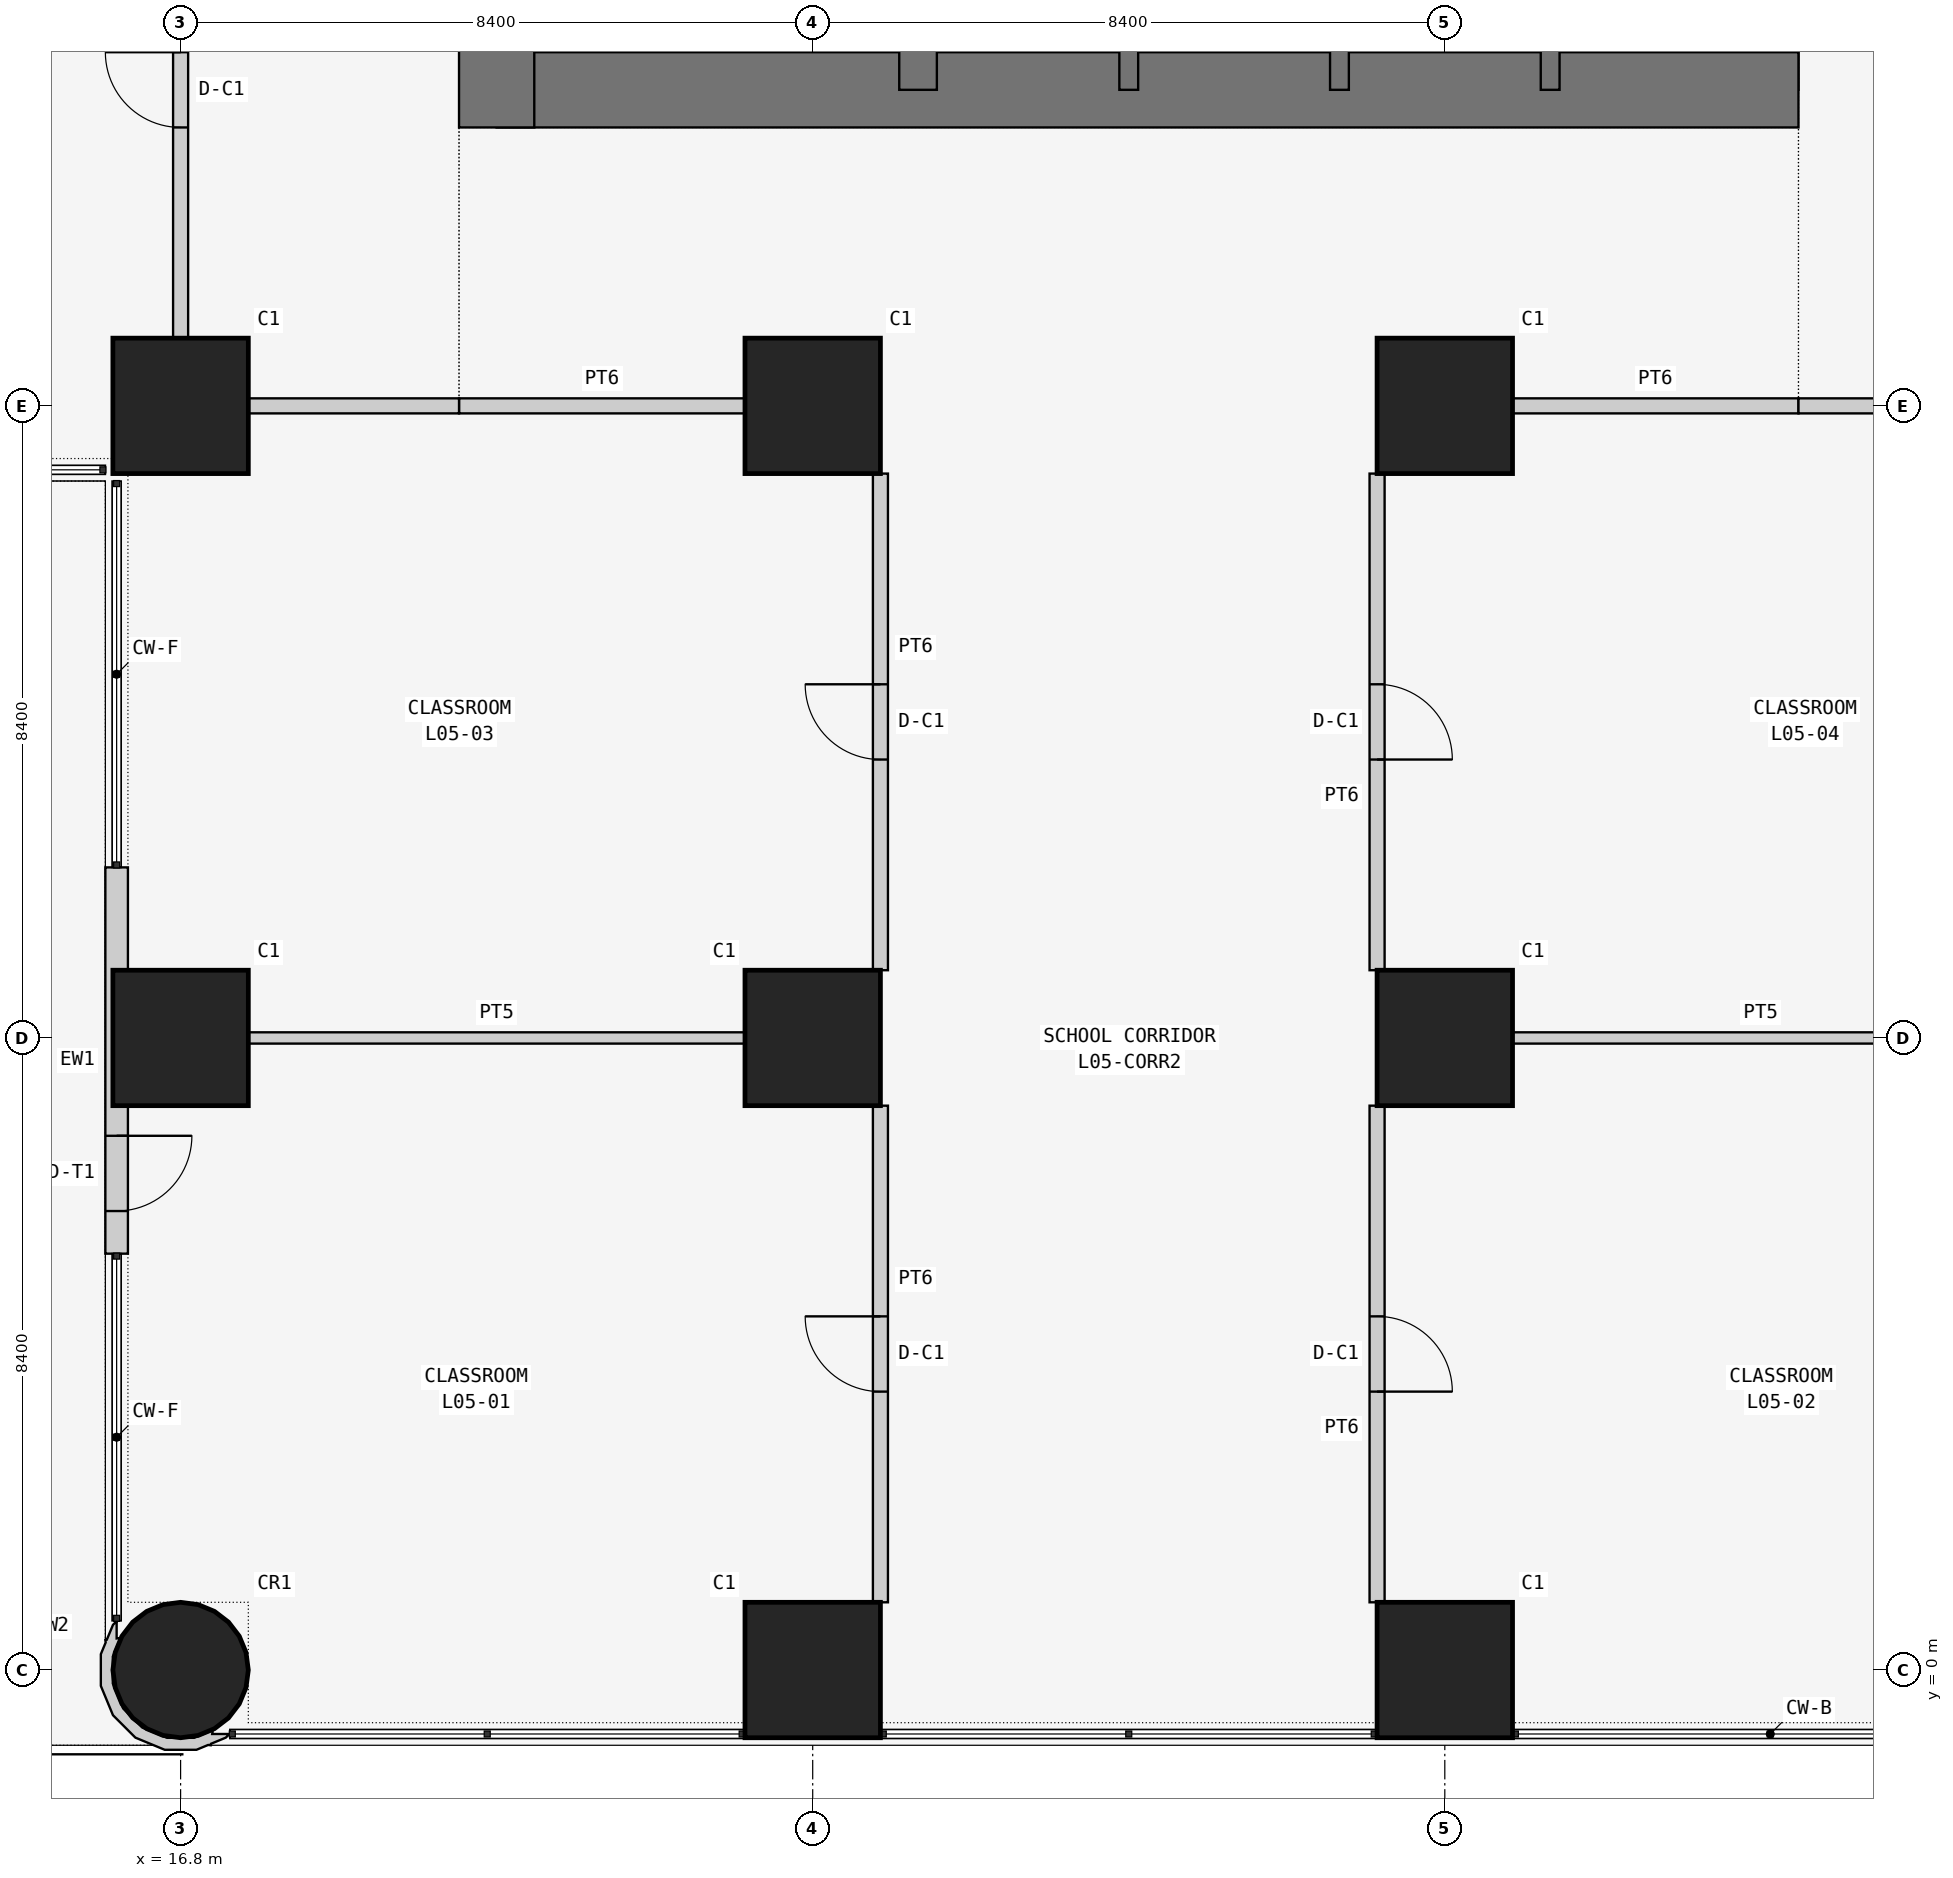
"""IFC4 building model, lengths in metres.
Left out: names, types, materials, properties, quantities, classifications, styles, units other than length and angle.
Written with IfcOpenShell. Run it as: python <this file> out.ifc"""

import sys

from ifc_helpers import new_model, si_unit, direction, frame, frame_2d, origin, origin_2d, place, context, subcontext, project, spatial, polyline, rectangle, circle, outline, extrude, element, fill, save


model = new_model("IFC4")
c1 = context("Model", 3, precision=1e-05, world=origin(), true_north=direction((0.0, 1.0)))
c2 = subcontext(c1, "Body", "Model", "MODEL_VIEW")
j1 = project(units=[si_unit("LENGTHUNIT", "METRE"), si_unit("PLANEANGLEUNIT", "RADIAN")], contexts=[c1])
p1 = place(None, origin())
s1 = spatial("IfcSite", under=j1, at=p1, CompositionType="ELEMENT")
p2 = place(p1, origin())
s2 = spatial("IfcBuilding", under=s1, at=p2, CompositionType="ELEMENT")
p3 = place(p2, frame((0.0, 0.0, 24.0)))
s3 = spatial("IfcBuildingStorey", under=s2, at=p3, CompositionType="ELEMENT", Elevation=24.0)
p4 = place(p3, frame((16.8, 0.0, 0.0), z_axis=(0.0, 0.0, 1.0), x_axis=(1.0, 0.0, 0.0)))
e1 = element("IfcColumn", 1, at=p4, inside=s3, PredefinedType="COLUMN", context=c2, shape_type="SweptSolid", body=[
    extrude(circle(Radius=0.9, at=origin_2d()), origin(), (0.0, 0.0, 1.0), 4.5),
])
for number, where, z_axis, x_axis in (
    (2, (16.8, 8.4, 0.0), (0.0, 0.0, 1.0), (1.0, 0.0, 0.0)),
    (3, (16.8, 16.8, 0.0), (0.0, 0.0, 1.0), (1.0, 0.0, 0.0)),
    (4, (25.2, 0.0, 0.0), (0.0, 0.0, 1.0), (1.0, 0.0, 0.0)),
    (5, (25.2, 8.4, 0.0), (0.0, 0.0, 1.0), (1.0, 0.0, 0.0)),
    (6, (25.2, 16.8, 0.0), (0.0, 0.0, 1.0), (1.0, 0.0, 0.0)),
    (7, (33.6, 0.0, 0.0), (0.0, 0.0, 1.0), (1.0, 0.0, 0.0)),
    (8, (33.6, 8.4, 0.0), (0.0, 0.0, 1.0), (1.0, 0.0, 0.0)),
    (9, (33.6, 16.8, 0.0), (0.0, 0.0, 1.0), (1.0, 0.0, 0.0)),
):
    element("IfcColumn", number, at=place(p3, frame(where, z_axis=z_axis, x_axis=x_axis)), inside=s3, PredefinedType="COLUMN", context=c2, shape_type="SweptSolid", body=[
        extrude(rectangle(XDim=1.8, YDim=1.8, at=origin_2d()), origin(), (0.0, 0.0, 1.0), 4.5),
    ])
p5 = place(p3, frame((21.0, 21.0, 0.0), z_axis=(0.0, 0.0, 1.0), x_axis=(1.0, 0.0, 0.0)))
e10 = element("IfcWall", 10, at=p5, inside=s3, PredefinedType="SHEAR", context=c2, shape_type="SweptSolid", body=[
    extrude(rectangle(XDim=17.3, YDim=1.0, at=frame_2d((8.65, 0.0))), origin(), (0.0, 0.0, 1.0), 4.5),
])
p6 = place(p3, frame((37.8, 21.0, 0.0), z_axis=(0.0, 0.0, 1.0), x_axis=(0.0, 1.0, 0.0)))
e11 = element("IfcWall", 11, at=p6, inside=s3, PredefinedType="SHEAR", context=c2, shape_type="SweptSolid", body=[
    extrude(rectangle(XDim=17.3, YDim=1.0, at=frame_2d((8.65, 0.0))), origin(), (0.0, 0.0, 1.0), 4.5),
])
p7 = place(p6, frame((5.2, 0.0, 0.0)))
e12 = element("IfcOpeningElement", 12, at=p7, cuts=e11, PredefinedType="OPENING", context=c2, shape_type="SweptSolid", body=[
    extrude(rectangle(XDim=1.2, YDim=2.1, at=frame_2d((0.6, 1.05))), frame((0.0, 0.51, 0.0), z_axis=(0.0, -1.0, 0.0), x_axis=(1.0, 0.0, 0.0)), (0.0, 0.0, 1.0), 1.02),
])
p8 = place(p3, frame((21.0, 37.8, 0.0), z_axis=(0.0, 0.0, 1.0), x_axis=(0.0, -1.0, 0.0)))
e13 = element("IfcWall", 13, at=p8, inside=s3, PredefinedType="SHEAR", context=c2, shape_type="SweptSolid", body=[
    extrude(rectangle(XDim=17.3, YDim=1.0, at=frame_2d((8.65, 0.0))), origin(), (0.0, 0.0, 1.0), 4.5),
])
p9 = place(p8, frame((5.4, 0.0, 0.0)))
e14 = element("IfcOpeningElement", 14, at=p9, cuts=e13, PredefinedType="OPENING", context=c2, shape_type="SweptSolid", body=[
    extrude(rectangle(XDim=1.2, YDim=2.1, at=frame_2d((0.6, 1.05))), frame((0.0, 0.51, 0.0), z_axis=(0.0, -1.0, 0.0), x_axis=(1.0, 0.0, 0.0)), (0.0, 0.0, 1.0), 1.02),
])
p10 = place(p3, frame((26.6, 21.0, 0.0), z_axis=(0.0, 0.0, 1.0), x_axis=(0.0, 1.0, 0.0)))
e15 = element("IfcWall", 15, at=p10, inside=s3, PredefinedType="SHEAR", context=c2, shape_type="SweptSolid", body=[
    extrude(rectangle(XDim=16.8, YDim=0.5, at=frame_2d((8.4, 0.0))), origin(), (0.0, 0.0, 1.0), 4.5),
])
p11 = place(p10, frame((10.4, 0.0, 0.0)))
e16 = element("IfcOpeningElement", 16, at=p11, cuts=e15, PredefinedType="OPENING", context=c2, shape_type="SweptSolid", body=[
    extrude(rectangle(XDim=1.2, YDim=2.1, at=frame_2d((0.6, 1.05))), frame((0.0, 0.26, 0.0), z_axis=(0.0, -1.0, 0.0), x_axis=(1.0, 0.0, 0.0)), (0.0, 0.0, 1.0), 0.52),
])
for number, where, z_axis, x_axis in (
    (17, (29.4, 21.0, 0.0), (0.0, 0.0, 1.0), (0.0, 1.0, 0.0)),
    (18, (32.2, 21.0, 0.0), (0.0, 0.0, 1.0), (0.0, 1.0, 0.0)),
    (19, (35.0, 21.0, 0.0), (0.0, 0.0, 1.0), (0.0, 1.0, 0.0)),
):
    element("IfcWall", number, at=place(p3, frame(where, z_axis=z_axis, x_axis=x_axis)), inside=s3, PredefinedType="SHEAR", context=c2, shape_type="SweptSolid", body=[
        extrude(rectangle(XDim=3.2, YDim=0.25, at=frame_2d((1.6, 0.0))), origin(), (0.0, 0.0, 1.0), 4.5),
    ])
p12 = place(p3, frame((15.95, 10.667, 0.0), z_axis=(0.0, 0.0, 1.0), x_axis=(0.0, -1.0, 0.0)))
e20 = element("IfcWall", 20, at=p12, inside=s3, PredefinedType="SOLIDWALL", context=c2, shape_type="SweptSolid", body=[
    extrude(rectangle(XDim=5.134, YDim=0.3, at=frame_2d((2.567, 0.0))), origin(), (0.0, 0.0, 1.0), 4.25),
])
p13 = place(p12, frame((3.567, 0.0, 0.0)))
e21 = element("IfcOpeningElement", 21, at=p13, cuts=e20, PredefinedType="OPENING", context=c2, shape_type="SweptSolid", body=[
    extrude(rectangle(XDim=1.0, YDim=2.4, at=frame_2d((0.5, 1.2))), frame((0.0, 0.16, 0.0), z_axis=(0.0, -1.0, 0.0), x_axis=(1.0, 0.0, 0.0)), (0.0, 0.0, 1.0), 0.32),
])
p14 = place(p3, frame((16.021, 0.595, 0.0), z_axis=(0.0, 0.0, 1.0), x_axis=(-0.707106781187, -0.707106781187, 0.0)))
e22 = element("IfcWall", 22, at=p14, inside=s3, PredefinedType="SOLIDWALL", context=c2, shape_type="SweptSolid", body=[
    extrude(outline(polyline([(0.294, 1.961), (0.279, 1.949), (0.081, 2.031), (0.012, 2.031), (0.174, 1.869), (0.133, 1.838), (0.38, 1.735), (0.634, 1.482), (0.771, 1.151), (0.771, 0.792), (0.634, 0.461), (0.38, 0.207), (0.133, 0.105), (0.174, 0.073), (0.012, -0.089), (0.081, -0.089), (0.279, -0.007), (0.294, -0.019), (0.315, 0.008), (0.47, 0.073), (0.768, 0.371), (0.93, 0.76), (0.93, 1.182), (0.769, 1.572), (0.47, 1.87), (0.315, 1.934), (0.294, 1.961)])), origin(), (0.0, 0.0, 1.0), 4.25),
])
p15 = place(p3, frame((17.7, 8.4, 0.0), z_axis=(0.0, 0.0, 1.0), x_axis=(1.0, 0.0, 0.0)))
e23 = element("IfcWall", 23, at=p15, inside=s3, PredefinedType="PARTITIONING", context=c2, shape_type="SweptSolid", body=[
    extrude(rectangle(XDim=6.6, YDim=0.15, at=frame_2d((3.3, 0.0))), origin(), (0.0, 0.0, 1.0), 3.409),
])
p16 = place(p3, frame((26.1, 7.5, 0.0), z_axis=(0.0, 0.0, 1.0), x_axis=(0.0, -1.0, 0.0)))
e24 = element("IfcWall", 24, at=p16, inside=s3, PredefinedType="PARTITIONING", context=c2, shape_type="SweptSolid", body=[
    extrude(rectangle(XDim=6.6, YDim=0.2, at=frame_2d((3.3, 0.0))), origin(), (0.0, 0.0, 1.0), 4.25),
])
p17 = place(p16, frame((2.8, 0.0, 0.0)))
e25 = element("IfcOpeningElement", 25, at=p17, cuts=e24, PredefinedType="OPENING", context=c2, shape_type="SweptSolid", body=[
    extrude(rectangle(XDim=1.0, YDim=2.1, at=frame_2d((0.5, 1.05))), frame((0.0, 0.11, 0.0), z_axis=(0.0, -1.0, 0.0), x_axis=(1.0, 0.0, 0.0)), (0.0, 0.0, 1.0), 0.22),
])
p18 = place(p3, frame((34.5, 8.4, 0.0), z_axis=(0.0, 0.0, 1.0), x_axis=(1.0, 0.0, 0.0)))
e26 = element("IfcWall", 26, at=p18, inside=s3, PredefinedType="PARTITIONING", context=c2, shape_type="SweptSolid", body=[
    extrude(rectangle(XDim=6.6, YDim=0.15, at=frame_2d((3.3, 0.0))), origin(), (0.0, 0.0, 1.0), 3.409),
])
p19 = place(p3, frame((32.7, 0.9, 0.0), z_axis=(0.0, 0.0, 1.0), x_axis=(0.0, 1.0, 0.0)))
e27 = element("IfcWall", 27, at=p19, inside=s3, PredefinedType="PARTITIONING", context=c2, shape_type="SweptSolid", body=[
    extrude(rectangle(XDim=6.6, YDim=0.2, at=frame_2d((3.3, 0.0))), origin(), (0.0, 0.0, 1.0), 4.25),
])
p20 = place(p19, frame((2.8, 0.0, 0.0)))
e28 = element("IfcOpeningElement", 28, at=p20, cuts=e27, PredefinedType="OPENING", context=c2, shape_type="SweptSolid", body=[
    extrude(rectangle(XDim=1.0, YDim=2.1, at=frame_2d((0.5, 1.05))), frame((0.0, 0.11, 0.0), z_axis=(0.0, -1.0, 0.0), x_axis=(1.0, 0.0, 0.0)), (0.0, 0.0, 1.0), 0.22),
])
p21 = place(p3, frame((20.5, 16.8, 0.0), z_axis=(0.0, 0.0, 1.0), x_axis=(1.0, 0.0, 0.0)))
e29 = element("IfcWall", 29, at=p21, inside=s3, PredefinedType="PARTITIONING", context=c2, shape_type="SweptSolid", body=[
    extrude(rectangle(XDim=3.8, YDim=0.2, at=frame_2d((1.9, 0.0))), origin(), (0.0, 0.0, 1.0), 3.409),
])
p22 = place(p3, frame((26.1, 15.9, 0.0), z_axis=(0.0, 0.0, 1.0), x_axis=(0.0, -1.0, 0.0)))
e30 = element("IfcWall", 30, at=p22, inside=s3, PredefinedType="PARTITIONING", context=c2, shape_type="SweptSolid", body=[
    extrude(rectangle(XDim=6.6, YDim=0.2, at=frame_2d((3.3, 0.0))), origin(), (0.0, 0.0, 1.0), 4.25),
])
p23 = place(p22, frame((2.8, 0.0, 0.0)))
e31 = element("IfcOpeningElement", 31, at=p23, cuts=e30, PredefinedType="OPENING", context=c2, shape_type="SweptSolid", body=[
    extrude(rectangle(XDim=1.0, YDim=2.1, at=frame_2d((0.5, 1.05))), frame((0.0, 0.11, 0.0), z_axis=(0.0, -1.0, 0.0), x_axis=(1.0, 0.0, 0.0)), (0.0, 0.0, 1.0), 0.22),
])
p24 = place(p3, frame((17.7, 16.8, 0.0), z_axis=(0.0, 0.0, 1.0), x_axis=(1.0, 0.0, 0.0)))
e32 = element("IfcWall", 32, at=p24, inside=s3, PredefinedType="PARTITIONING", context=c2, shape_type="SweptSolid", body=[
    extrude(rectangle(XDim=2.8, YDim=0.2, at=frame_2d((1.4, 0.0))), origin(), (0.0, 0.0, 1.0), 3.409),
])
p25 = place(p3, frame((32.7, 9.3, 0.0), z_axis=(0.0, 0.0, 1.0), x_axis=(0.0, 1.0, 0.0)))
e33 = element("IfcWall", 33, at=p25, inside=s3, PredefinedType="PARTITIONING", context=c2, shape_type="SweptSolid", body=[
    extrude(rectangle(XDim=6.6, YDim=0.2, at=frame_2d((3.3, 0.0))), origin(), (0.0, 0.0, 1.0), 4.25),
])
p26 = place(p25, frame((2.8, 0.0, 0.0)))
e34 = element("IfcOpeningElement", 34, at=p26, cuts=e33, PredefinedType="OPENING", context=c2, shape_type="SweptSolid", body=[
    extrude(rectangle(XDim=1.0, YDim=2.1, at=frame_2d((0.5, 1.05))), frame((0.0, 0.11, 0.0), z_axis=(0.0, -1.0, 0.0), x_axis=(1.0, 0.0, 0.0)), (0.0, 0.0, 1.0), 0.22),
])
p27 = place(p3, frame((34.5, 16.8, 0.0), z_axis=(0.0, 0.0, 1.0), x_axis=(1.0, 0.0, 0.0)))
e35 = element("IfcWall", 35, at=p27, inside=s3, PredefinedType="PARTITIONING", context=c2, shape_type="SweptSolid", body=[
    extrude(rectangle(XDim=3.8, YDim=0.2, at=frame_2d((1.9, 0.0))), origin(), (0.0, 0.0, 1.0), 3.409),
])
p28 = place(p3, frame((38.3, 16.8, 0.0), z_axis=(0.0, 0.0, 1.0), x_axis=(1.0, 0.0, 0.0)))
e36 = element("IfcWall", 36, at=p28, inside=s3, PredefinedType="PARTITIONING", context=c2, shape_type="SweptSolid", body=[
    extrude(rectangle(XDim=2.8, YDim=0.2, at=frame_2d((1.4, 0.0))), origin(), (0.0, 0.0, 1.0), 3.409),
])
p29 = place(p3, frame((16.8, 24.3, 0.0), z_axis=(0.0, 0.0, 1.0), x_axis=(0.0, -1.0, 0.0)))
e37 = element("IfcWall", 37, at=p29, inside=s3, PredefinedType="PARTITIONING", context=c2, shape_type="SweptSolid", body=[
    extrude(rectangle(XDim=6.6, YDim=0.2, at=frame_2d((3.3, 0.0))), origin(), (0.0, 0.0, 1.0), 3.409),
])
p30 = place(p29, frame((2.8, 0.0, 0.0)))
e38 = element("IfcOpeningElement", 38, at=p30, cuts=e37, PredefinedType="OPENING", context=c2, shape_type="SweptSolid", body=[
    extrude(rectangle(XDim=1.0, YDim=2.1, at=frame_2d((0.5, 1.05))), frame((0.0, 0.11, 0.0), z_axis=(0.0, -1.0, 0.0), x_axis=(1.0, 0.0, 0.0)), (0.0, 0.0, 1.0), 0.22),
])
p31 = place(p13, origin())
e39 = element("IfcDoor", 39, at=p31, inside=s3, OperationType="SINGLE_SWING_LEFT", PredefinedType="DOOR", context=c2, shape_type="SweptSolid", body=[
    extrude(rectangle(XDim=1.0, YDim=2.4, at=frame_2d((0.5, 1.2))), frame((0.0, 0.025, 0.0), z_axis=(0.0, -1.0, 0.0), x_axis=(1.0, 0.0, 0.0)), (0.0, 0.0, 1.0), 0.05),
])
fill(e21, e39)
p32 = place(p17, frame((1.0, 0.0, 0.0), z_axis=(0.0, 0.0, 1.0), x_axis=(-1.0, 0.0, 0.0)))
e40 = element("IfcDoor", 40, at=p32, inside=s3, OperationType="SINGLE_SWING_RIGHT", PredefinedType="DOOR", context=c2, shape_type="SweptSolid", body=[
    extrude(rectangle(XDim=1.0, YDim=2.1, at=frame_2d((0.5, 1.05))), frame((0.0, 0.025, 0.0), z_axis=(0.0, -1.0, 0.0), x_axis=(1.0, 0.0, 0.0)), (0.0, 0.0, 1.0), 0.05),
])
fill(e25, e40)
p33 = place(p20, frame((1.0, 0.0, 0.0), z_axis=(0.0, 0.0, 1.0), x_axis=(-1.0, 0.0, 0.0)))
e41 = element("IfcDoor", 41, at=p33, inside=s3, OperationType="SINGLE_SWING_RIGHT", PredefinedType="DOOR", context=c2, shape_type="SweptSolid", body=[
    extrude(rectangle(XDim=1.0, YDim=2.1, at=frame_2d((0.5, 1.05))), frame((0.0, 0.025, 0.0), z_axis=(0.0, -1.0, 0.0), x_axis=(1.0, 0.0, 0.0)), (0.0, 0.0, 1.0), 0.05),
])
fill(e28, e41)
p34 = place(p23, frame((1.0, 0.0, 0.0), z_axis=(0.0, 0.0, 1.0), x_axis=(-1.0, 0.0, 0.0)))
e42 = element("IfcDoor", 42, at=p34, inside=s3, OperationType="SINGLE_SWING_RIGHT", PredefinedType="DOOR", context=c2, shape_type="SweptSolid", body=[
    extrude(rectangle(XDim=1.0, YDim=2.1, at=frame_2d((0.5, 1.05))), frame((0.0, 0.025, 0.0), z_axis=(0.0, -1.0, 0.0), x_axis=(1.0, 0.0, 0.0)), (0.0, 0.0, 1.0), 0.05),
])
fill(e31, e42)
p35 = place(p26, frame((1.0, 0.0, 0.0), z_axis=(0.0, 0.0, 1.0), x_axis=(-1.0, 0.0, 0.0)))
e43 = element("IfcDoor", 43, at=p35, inside=s3, OperationType="SINGLE_SWING_RIGHT", PredefinedType="DOOR", context=c2, shape_type="SweptSolid", body=[
    extrude(rectangle(XDim=1.0, YDim=2.1, at=frame_2d((0.5, 1.05))), frame((0.0, 0.025, 0.0), z_axis=(0.0, -1.0, 0.0), x_axis=(1.0, 0.0, 0.0)), (0.0, 0.0, 1.0), 0.05),
])
fill(e34, e43)
p36 = place(p30, frame((1.0, 0.0, 0.0), z_axis=(0.0, 0.0, 1.0), x_axis=(-1.0, 0.0, 0.0)))
e44 = element("IfcDoor", 44, at=p36, inside=s3, OperationType="SINGLE_SWING_RIGHT", PredefinedType="DOOR", context=c2, shape_type="SweptSolid", body=[
    extrude(rectangle(XDim=1.0, YDim=2.1, at=frame_2d((0.5, 1.05))), frame((0.0, 0.025, 0.0), z_axis=(0.0, -1.0, 0.0), x_axis=(1.0, 0.0, 0.0)), (0.0, 0.0, 1.0), 0.05),
])
fill(e38, e44)
save(model, sys.argv[1])
